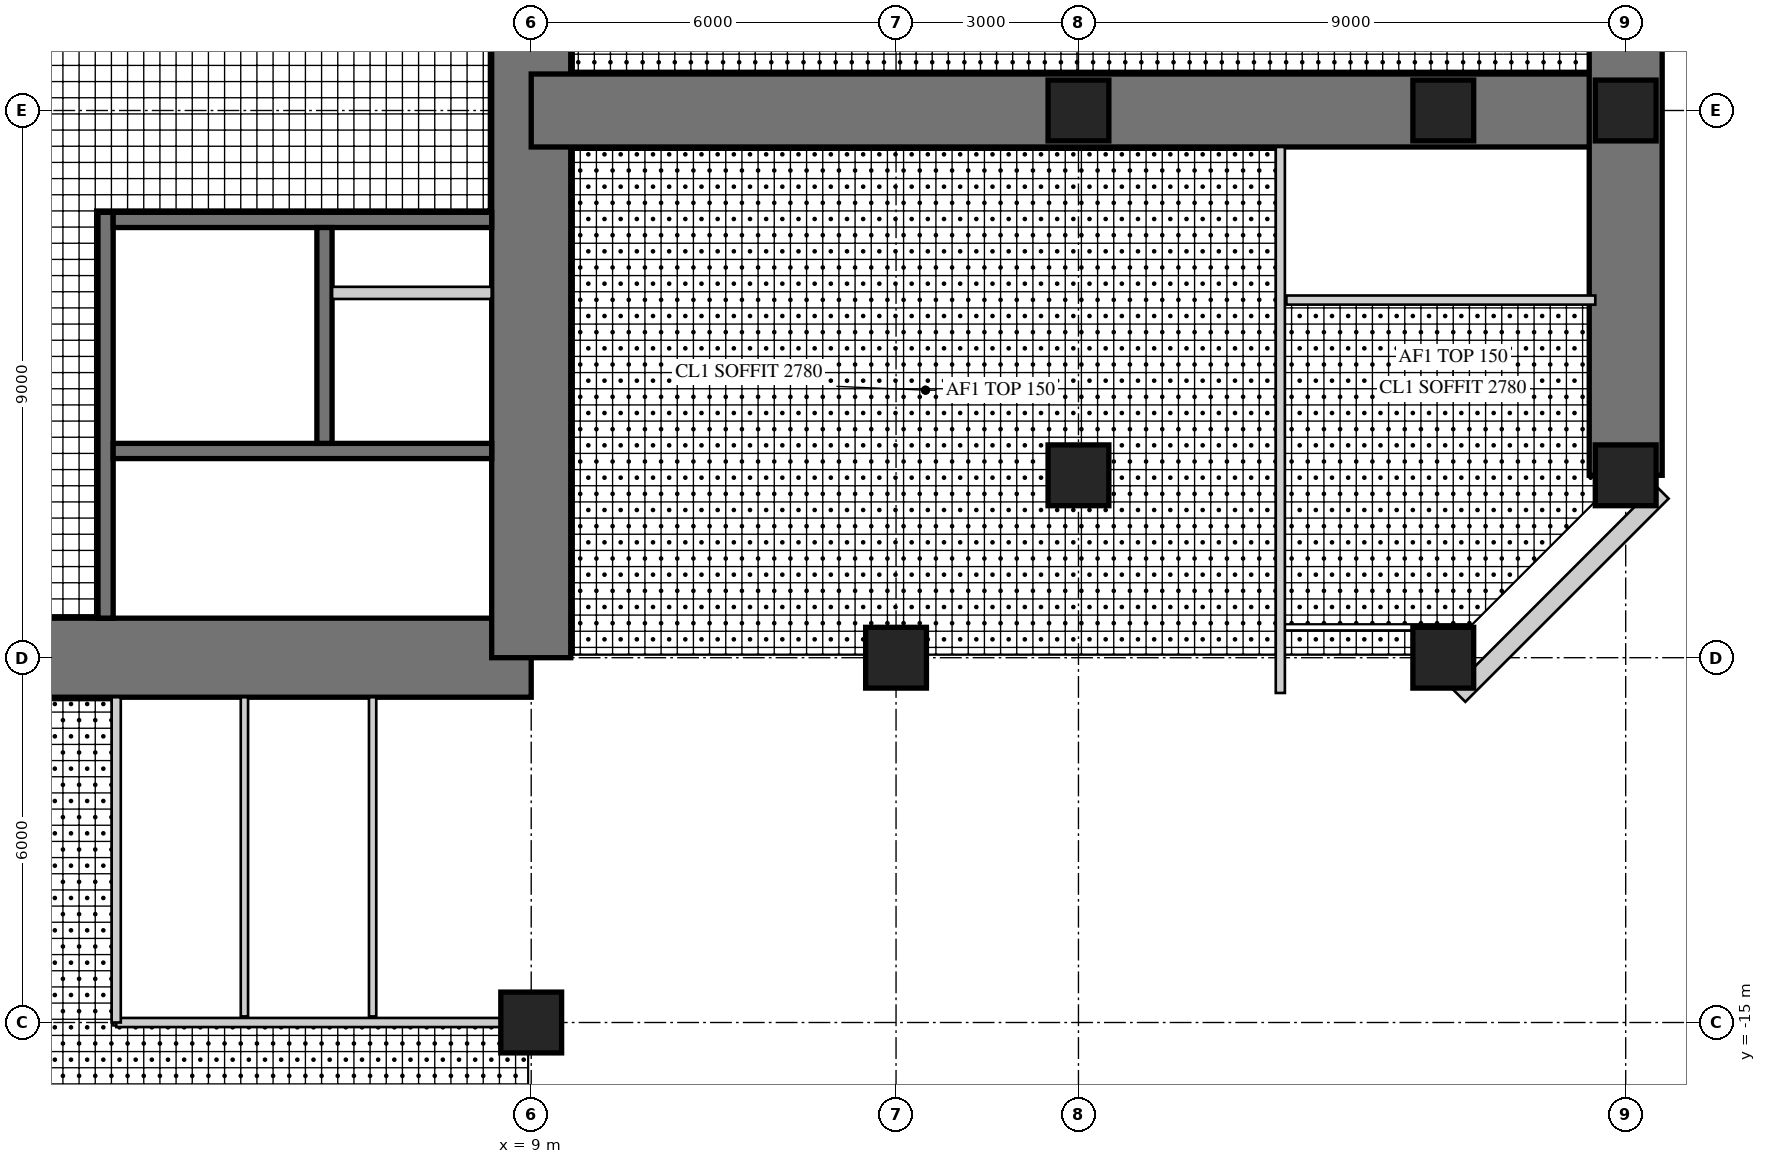
"""IFC4 building model, lengths in metres.
Left out: names, types, materials, properties, quantities, classifications, styles, units other than length and angle.
Written with IfcOpenShell. Run it as: python <this file> out.ifc"""

import sys

from ifc_helpers import new_model, si_unit, direction, frame, frame_2d, origin, origin_2d, place, context, subcontext, project, spatial, rectangle, hollow_rectangle, extrude, element, fill, save


model = new_model("IFC4")
c1 = context("Model", 3, precision=1e-05, world=origin(), true_north=direction((0.0, 1.0)))
c2 = subcontext(c1, "Body", "Model", "MODEL_VIEW")
j1 = project(units=[si_unit("LENGTHUNIT", "METRE"), si_unit("PLANEANGLEUNIT", "RADIAN")], contexts=[c1])
p1 = place(None, origin())
s1 = spatial("IfcSite", under=j1, at=p1, CompositionType="ELEMENT")
p2 = place(p1, origin())
s2 = spatial("IfcBuilding", under=s1, at=p2, CompositionType="ELEMENT")
p3 = place(p2, frame((0.0, 0.0, 116.5)))
s3 = spatial("IfcBuildingStorey", under=s2, at=p3, CompositionType="ELEMENT", Elevation=116.5)
p4 = place(p3, frame((-9.0, -9.0, 0.0), z_axis=(0.0, 0.0, 1.0), x_axis=(1.0, 0.0, 0.0)))
e1 = element("IfcWall", 1, at=p4, inside=s3, PredefinedType="SHEAR", context=c2, shape_type="SweptSolid", body=[
    extrude(rectangle(XDim=18.0, YDim=1.3, at=frame_2d((9.0, 0.0))), origin(), (0.0, 0.0, 1.0), 4.0),
])
p5 = place(p4, frame((9.8, 0.0, 0.0)))
e2 = element("IfcOpeningElement", 2, at=p5, cuts=e1, PredefinedType="OPENING", context=c2, shape_type="SweptSolid", body=[
    extrude(rectangle(XDim=1.0, YDim=2.4, at=frame_2d((0.5, 1.2))), frame((0.0, 0.66, 0.0), z_axis=(0.0, -1.0, 0.0), x_axis=(1.0, 0.0, 0.0)), (0.0, 0.0, 1.0), 1.32),
])
p6 = place(p3, frame((9.0, -9.0, 0.0), z_axis=(0.0, 0.0, 1.0), x_axis=(0.0, 1.0, 0.0)))
e3 = element("IfcWall", 3, at=p6, inside=s3, PredefinedType="SHEAR", context=c2, shape_type="SweptSolid", body=[
    extrude(rectangle(XDim=18.0, YDim=1.3, at=frame_2d((9.0, 0.0))), origin(), (0.0, 0.0, 1.0), 4.0),
])
p7 = place(p6, frame((9.8, 0.0, 0.0)))
e4 = element("IfcOpeningElement", 4, at=p7, cuts=e3, PredefinedType="OPENING", context=c2, shape_type="SweptSolid", body=[
    extrude(rectangle(XDim=1.0, YDim=2.4, at=frame_2d((0.5, 1.2))), frame((0.0, 0.66, 0.0), z_axis=(0.0, -1.0, 0.0), x_axis=(1.0, 0.0, 0.0)), (0.0, 0.0, 1.0), 1.32),
])
p8 = place(p3, frame((2.0, -1.675, 0.0), z_axis=(0.0, 0.0, 1.0), x_axis=(0.0, -1.0, 0.0)))
e5 = element("IfcWall", 5, at=p8, inside=s3, PredefinedType="SHEAR", context=c2, shape_type="SweptSolid", body=[
    extrude(rectangle(XDim=6.675, YDim=0.25, at=frame_2d((3.337, 0.0))), origin(), (0.0, 0.0, 1.0), 4.0),
])
p9 = place(p8, frame((0.725, 0.0, 0.0)))
e6 = element("IfcOpeningElement", 6, at=p9, cuts=e5, PredefinedType="OPENING", context=c2, shape_type="SweptSolid", body=[
    extrude(rectangle(XDim=1.0, YDim=2.1, at=frame_2d((0.5, 1.05))), frame((0.0, 0.135, 0.0), z_axis=(0.0, -1.0, 0.0), x_axis=(1.0, 0.0, 0.0)), (0.0, 0.0, 1.0), 0.27),
])
p10 = place(p3, frame((2.125, -1.8, 0.0), z_axis=(0.0, 0.0, 1.0), x_axis=(1.0, 0.0, 0.0)))
e7 = element("IfcWall", 7, at=p10, inside=s3, PredefinedType="SHEAR", context=c2, shape_type="SweptSolid", body=[
    extrude(rectangle(XDim=6.225, YDim=0.25, at=frame_2d((3.113, 0.0))), origin(), (0.0, 0.0, 1.0), 4.0),
])
p11 = place(p3, frame((2.125, -5.6, 0.0), z_axis=(0.0, 0.0, 1.0), x_axis=(1.0, 0.0, 0.0)))
e8 = element("IfcWall", 8, at=p11, inside=s3, PredefinedType="SHEAR", context=c2, shape_type="SweptSolid", body=[
    extrude(rectangle(XDim=6.225, YDim=0.25, at=frame_2d((3.113, 0.0))), origin(), (0.0, 0.0, 1.0), 4.0),
])
p12 = place(p11, frame((0.175, 0.0, 0.0)))
e9 = element("IfcOpeningElement", 9, at=p12, cuts=e8, PredefinedType="OPENING", context=c2, shape_type="SweptSolid", body=[
    extrude(rectangle(XDim=1.0, YDim=2.1, at=frame_2d((0.5, 1.05))), frame((0.0, 0.135, 0.0), z_axis=(0.0, -1.0, 0.0), x_axis=(1.0, 0.0, 0.0)), (0.0, 0.0, 1.0), 0.27),
])
p13 = place(p3, frame((5.6, -1.925, 0.0), z_axis=(0.0, 0.0, 1.0), x_axis=(0.0, -1.0, 0.0)))
e10 = element("IfcWall", 10, at=p13, inside=s3, PredefinedType="SHEAR", context=c2, shape_type="SweptSolid", body=[
    extrude(rectangle(XDim=3.55, YDim=0.25, at=frame_2d((1.775, 0.0))), origin(), (0.0, 0.0, 1.0), 4.0),
])
p14 = place(p13, frame((1.525, 0.0, 0.0)))
e11 = element("IfcOpeningElement", 11, at=p14, cuts=e10, PredefinedType="OPENING", context=c2, shape_type="SweptSolid", body=[
    extrude(rectangle(XDim=1.1, YDim=2.2, at=frame_2d((0.55, 1.1))), frame((0.0, 0.135, 0.0), z_axis=(0.0, -1.0, 0.0), x_axis=(1.0, 0.0, 0.0)), (0.0, 0.0, 1.0), 0.27),
])
p15 = place(p13, frame((0.075, 0.0, 0.0)))
e12 = element("IfcOpeningElement", 12, at=p15, cuts=e10, PredefinedType="OPENING", context=c2, shape_type="SweptSolid", body=[
    extrude(rectangle(XDim=0.8, YDim=2.1, at=frame_2d((0.4, 1.05))), frame((0.0, 0.135, 0.0), z_axis=(0.0, -1.0, 0.0), x_axis=(1.0, 0.0, 0.0)), (0.0, 0.0, 1.0), 0.27),
])
p16 = place(p3, frame((5.725, -3.0, 0.0), z_axis=(0.0, 0.0, 1.0), x_axis=(1.0, 0.0, 0.0)))
e13 = element("IfcWall", 13, at=p16, inside=s3, PredefinedType="PARTITIONING", context=c2, shape_type="SweptSolid", body=[
    extrude(rectangle(XDim=2.625, YDim=0.2, at=frame_2d((1.312, 0.0))), origin(), (0.0, 0.0, 1.0), 4.0),
])
p17 = place(p3, frame((9.0, 0.0, 0.0), z_axis=(0.0, 0.0, 1.0), x_axis=(1.0, 0.0, 0.0)))
e14 = element("IfcWall", 14, at=p17, inside=s3, PredefinedType="SHEAR", context=c2, shape_type="SweptSolid", body=[
    extrude(rectangle(XDim=18.0, YDim=1.2, at=frame_2d((9.0, 0.0))), origin(), (0.0, 0.0, 1.0), 4.0),
])
p18 = place(p17, frame((9.8, 0.0, 0.0)))
e15 = element("IfcOpeningElement", 15, at=p18, cuts=e14, PredefinedType="OPENING", context=c2, shape_type="SweptSolid", body=[
    extrude(rectangle(XDim=1.0, YDim=2.2, at=frame_2d((0.5, 1.1))), frame((0.0, 0.61, 0.0), z_axis=(0.0, -1.0, 0.0), x_axis=(1.0, 0.0, 0.0)), (0.0, 0.0, 1.0), 1.22),
])
p19 = place(p3, frame((27.0, -6.0, 0.0), z_axis=(0.0, 0.0, 1.0), x_axis=(0.0, 1.0, 0.0)))
e16 = element("IfcWall", 16, at=p19, inside=s3, PredefinedType="SHEAR", context=c2, shape_type="SweptSolid", body=[
    extrude(rectangle(XDim=12.0, YDim=1.2, at=frame_2d((6.0, 0.0))), origin(), (0.0, 0.0, 1.0), 4.0),
])
p20 = place(p19, frame((1.55, 0.0, 0.6)))
e17 = element("IfcOpeningElement", 17, at=p20, cuts=e16, PredefinedType="OPENING", context=c2, shape_type="SweptSolid", body=[
    extrude(rectangle(XDim=3.0, YDim=2.4, at=frame_2d((1.5, 1.2))), frame((0.0, 0.61, 0.0), z_axis=(0.0, -1.0, 0.0), x_axis=(1.0, 0.0, 0.0)), (0.0, 0.0, 1.0), 1.22),
])
p21 = place(p19, frame((7.45, 0.0, 0.6)))
e18 = element("IfcOpeningElement", 18, at=p21, cuts=e16, PredefinedType="OPENING", context=c2, shape_type="SweptSolid", body=[
    extrude(rectangle(XDim=3.0, YDim=2.4, at=frame_2d((1.5, 1.2))), frame((0.0, 0.61, 0.0), z_axis=(0.0, -1.0, 0.0), x_axis=(1.0, 0.0, 0.0)), (0.0, 0.0, 1.0), 1.22),
])
for number, where, z_axis, x_axis in (
    (19, (15.0, -9.0, 0.0), (0.0, 0.0, 1.0), (1.0, 0.0, 0.0)),
    (20, (24.0, -9.0, 0.0), (0.0, 0.0, 1.0), (1.0, 0.0, 0.0)),
    (21, (27.0, -6.0, 0.0), (0.0, 0.0, 1.0), (1.0, 0.0, 0.0)),
    (22, (27.0, 0.0, 0.0), (0.0, 0.0, 1.0), (1.0, 0.0, 0.0)),
    (23, (9.0, -15.0, 0.0), (0.0, 0.0, 1.0), (1.0, 0.0, 0.0)),
    (24, (18.0, -6.0, 0.0), (0.0, 0.0, 1.0), (1.0, 0.0, 0.0)),
    (25, (18.0, 0.0, 0.0), (0.0, 0.0, 1.0), (1.0, 0.0, 0.0)),
    (26, (24.0, 0.0, 0.0), (0.0, 0.0, 1.0), (1.0, 0.0, 0.0)),
):
    element("IfcColumn", number, at=place(p3, frame(where, z_axis=z_axis, x_axis=x_axis)), inside=s3, PredefinedType="COLUMN", context=c2, shape_type="SweptSolid", body=[
        extrude(rectangle(XDim=1.0, YDim=1.0, at=origin_2d()), origin(), (0.0, 0.0, 1.0), 4.0),
    ])
p22 = place(p3, frame((24.257, -9.62, 0.0), z_axis=(0.0, 0.0, 1.0), x_axis=(0.707106781187, 0.707106781187, 0.0)))
e27 = element("IfcWall", 27, at=p22, inside=s3, PredefinedType="SOLIDWALL", context=c2, shape_type="SweptSolid", body=[
    extrude(rectangle(XDim=4.728, YDim=0.3, at=frame_2d((2.364, 0.0))), origin(), (0.0, 0.0, 1.0), 3.8),
])
p23 = place(p22, frame((1.914, 0.0, 0.3)))
e28 = element("IfcOpeningElement", 28, at=p23, cuts=e27, PredefinedType="OPENING", context=c2, shape_type="SweptSolid", body=[
    extrude(rectangle(XDim=0.9, YDim=2.4, at=frame_2d((0.45, 1.2))), frame((0.0, 0.16, 0.0), z_axis=(0.0, -1.0, 0.0), x_axis=(1.0, 0.0, 0.0)), (0.0, 0.0, 1.0), 0.32),
])
p24 = place(p3, frame((21.42, -3.118, 0.0), z_axis=(0.0, 0.0, 1.0), x_axis=(1.0, 0.0, 0.0)))
e29 = element("IfcWall", 29, at=p24, inside=s3, PredefinedType="PARTITIONING", context=c2, shape_type="SweptSolid", body=[
    extrude(rectangle(XDim=5.08, YDim=0.15, at=frame_2d((2.54, 0.0))), origin(), (0.0, 0.0, 1.0), 3.8),
])
p25 = place(p3, frame((21.32, -9.58, 0.0), z_axis=(0.0, 0.0, 1.0), x_axis=(0.0, 1.0, 0.0)))
e30 = element("IfcWall", 30, at=p25, inside=s3, PredefinedType="PARTITIONING", context=c2, shape_type="SweptSolid", body=[
    extrude(rectangle(XDim=8.98, YDim=0.15, at=frame_2d((4.49, 0.0))), origin(), (0.0, 0.0, 1.0), 3.8),
])
p26 = place(p25, frame((4.987, 0.0, 0.0)))
e31 = element("IfcOpeningElement", 31, at=p26, cuts=e30, PredefinedType="OPENING", context=c2, shape_type="SweptSolid", body=[
    extrude(rectangle(XDim=1.0, YDim=2.2, at=frame_2d((0.5, 1.1))), frame((0.0, 0.085, 0.0), z_axis=(0.0, -1.0, 0.0), x_axis=(1.0, 0.0, 0.0)), (0.0, 0.0, 1.0), 0.17),
])
p27 = place(p25, frame((7.63, 0.0, 0.0)))
e32 = element("IfcOpeningElement", 32, at=p27, cuts=e30, PredefinedType="OPENING", context=c2, shape_type="SweptSolid", body=[
    extrude(rectangle(XDim=1.0, YDim=2.2, at=frame_2d((0.5, 1.1))), frame((0.0, 0.085, 0.0), z_axis=(0.0, -1.0, 0.0), x_axis=(1.0, 0.0, 0.0)), (0.0, 0.0, 1.0), 0.17),
])
p28 = place(p3, frame((2.175, -15.0, 0.0), z_axis=(0.0, 0.0, 1.0), x_axis=(1.0, 0.0, 0.0)))
e33 = element("IfcWall", 33, at=p28, inside=s3, PredefinedType="PARTITIONING", context=c2, shape_type="SweptSolid", body=[
    extrude(rectangle(XDim=6.325, YDim=0.15, at=frame_2d((3.163, 0.0))), origin(), (0.0, 0.0, 1.0), 3.0),
])
p29 = place(p28, frame((0.554, 0.0, 0.0)))
e34 = element("IfcOpeningElement", 34, at=p29, cuts=e33, PredefinedType="OPENING", context=c2, shape_type="SweptSolid", body=[
    extrude(rectangle(XDim=1.0, YDim=2.1, at=frame_2d((0.5, 1.05))), frame((0.0, 0.085, 0.0), z_axis=(0.0, -1.0, 0.0), x_axis=(1.0, 0.0, 0.0)), (0.0, 0.0, 1.0), 0.17),
])
p30 = place(p28, frame((2.663, 0.0, 0.0)))
e35 = element("IfcOpeningElement", 35, at=p30, cuts=e33, PredefinedType="OPENING", context=c2, shape_type="SweptSolid", body=[
    extrude(rectangle(XDim=1.0, YDim=2.1, at=frame_2d((0.5, 1.05))), frame((0.0, 0.085, 0.0), z_axis=(0.0, -1.0, 0.0), x_axis=(1.0, 0.0, 0.0)), (0.0, 0.0, 1.0), 0.17),
])
p31 = place(p28, frame((4.771, 0.0, 0.0)))
e36 = element("IfcOpeningElement", 36, at=p31, cuts=e33, PredefinedType="OPENING", context=c2, shape_type="SweptSolid", body=[
    extrude(rectangle(XDim=1.0, YDim=2.1, at=frame_2d((0.5, 1.05))), frame((0.0, 0.085, 0.0), z_axis=(0.0, -1.0, 0.0), x_axis=(1.0, 0.0, 0.0)), (0.0, 0.0, 1.0), 0.17),
])
p32 = place(p3, frame((2.175, -9.65, 0.0), z_axis=(0.0, 0.0, 1.0), x_axis=(0.0, -1.0, 0.0)))
e37 = element("IfcWall", 37, at=p32, inside=s3, PredefinedType="PARTITIONING", context=c2, shape_type="SweptSolid", body=[
    extrude(rectangle(XDim=5.35, YDim=0.15, at=frame_2d((2.675, 0.0))), origin(), (0.0, 0.0, 1.0), 3.8),
])
for number, where, z_axis, x_axis in (
    (38, (4.283, -9.65, 0.0), (0.0, 0.0, 1.0), (0.0, -1.0, 0.0)),
    (39, (6.392, -9.65, 0.0), (0.0, 0.0, 1.0), (0.0, -1.0, 0.0)),
):
    element("IfcWall", number, at=place(p3, frame(where, z_axis=z_axis, x_axis=x_axis)), inside=s3, PredefinedType="PLUMBINGWALL", context=c2, shape_type="SweptSolid", body=[
        extrude(rectangle(XDim=5.25, YDim=0.12, at=frame_2d((2.625, 0.0))), origin(), (0.0, 0.0, 1.0), 3.8),
    ])
p33 = place(p23, origin())
e40 = element("IfcWindow", 40, at=p33, inside=s3, PartitioningType="SINGLE_PANEL", PredefinedType="WINDOW", context=c2, shape_type="SweptSolid", body=[
    extrude(hollow_rectangle(XDim=0.9, YDim=2.4, WallThickness=0.06, at=frame_2d((0.45, 1.2))), frame((0.0, 0.03, 0.0), z_axis=(0.0, -1.0, 0.0), x_axis=(1.0, 0.0, 0.0)), (0.0, 0.0, 1.0), 0.06),
    extrude(rectangle(XDim=0.779, YDim=2.279, at=frame_2d((0.45, 1.2))), frame((0.0, 0.03, 0.0), z_axis=(0.0, -1.0, 0.0), x_axis=(1.0, 0.0, 0.0)), (0.0, 0.0, 1.0), 0.06),
])
fill(e28, e40)
p34 = place(p20, origin())
e41 = element("IfcWindow", 41, at=p34, inside=s3, PartitioningType="SINGLE_PANEL", PredefinedType="WINDOW", context=c2, shape_type="SweptSolid", body=[
    extrude(hollow_rectangle(XDim=3.0, YDim=2.4, WallThickness=0.06, at=frame_2d((1.5, 1.2))), frame((0.0, 0.03, 0.0), z_axis=(0.0, -1.0, 0.0), x_axis=(1.0, 0.0, 0.0)), (0.0, 0.0, 1.0), 0.06),
    extrude(rectangle(XDim=2.879, YDim=2.279, at=frame_2d((1.5, 1.2))), frame((0.0, 0.03, 0.0), z_axis=(0.0, -1.0, 0.0), x_axis=(1.0, 0.0, 0.0)), (0.0, 0.0, 1.0), 0.06),
])
fill(e17, e41)
p35 = place(p26, frame((1.0, 0.0, 0.0), z_axis=(0.0, 0.0, 1.0), x_axis=(-1.0, 0.0, 0.0)))
e42 = element("IfcDoor", 42, at=p35, inside=s3, OperationType="SINGLE_SWING_LEFT", PredefinedType="DOOR", context=c2, shape_type="SweptSolid", body=[
    extrude(rectangle(XDim=1.0, YDim=2.2, at=frame_2d((0.5, 1.1))), frame((0.0, 0.025, 0.0), z_axis=(0.0, -1.0, 0.0), x_axis=(1.0, 0.0, 0.0)), (0.0, 0.0, 1.0), 0.05),
])
fill(e31, e42)
p36 = place(p27, frame((1.0, 0.0, 0.0), z_axis=(0.0, 0.0, 1.0), x_axis=(-1.0, 0.0, 0.0)))
e43 = element("IfcDoor", 43, at=p36, inside=s3, OperationType="SINGLE_SWING_LEFT", PredefinedType="DOOR", context=c2, shape_type="SweptSolid", body=[
    extrude(rectangle(XDim=1.0, YDim=2.2, at=frame_2d((0.5, 1.1))), frame((0.0, 0.025, 0.0), z_axis=(0.0, -1.0, 0.0), x_axis=(1.0, 0.0, 0.0)), (0.0, 0.0, 1.0), 0.05),
])
fill(e32, e43)
p37 = place(p29, origin())
e44 = element("IfcDoor", 44, at=p37, inside=s3, OperationType="SINGLE_SWING_LEFT", PredefinedType="DOOR", context=c2, shape_type="SweptSolid", body=[
    extrude(rectangle(XDim=1.0, YDim=2.1, at=frame_2d((0.5, 1.05))), frame((0.0, 0.025, 0.0), z_axis=(0.0, -1.0, 0.0), x_axis=(1.0, 0.0, 0.0)), (0.0, 0.0, 1.0), 0.05),
])
fill(e34, e44)
p38 = place(p30, origin())
e45 = element("IfcDoor", 45, at=p38, inside=s3, OperationType="SINGLE_SWING_LEFT", PredefinedType="DOOR", context=c2, shape_type="SweptSolid", body=[
    extrude(rectangle(XDim=1.0, YDim=2.1, at=frame_2d((0.5, 1.05))), frame((0.0, 0.025, 0.0), z_axis=(0.0, -1.0, 0.0), x_axis=(1.0, 0.0, 0.0)), (0.0, 0.0, 1.0), 0.05),
])
fill(e35, e45)
p39 = place(p31, origin())
e46 = element("IfcDoor", 46, at=p39, inside=s3, OperationType="SINGLE_SWING_LEFT", PredefinedType="DOOR", context=c2, shape_type="SweptSolid", body=[
    extrude(rectangle(XDim=1.0, YDim=2.1, at=frame_2d((0.5, 1.05))), frame((0.0, 0.025, 0.0), z_axis=(0.0, -1.0, 0.0), x_axis=(1.0, 0.0, 0.0)), (0.0, 0.0, 1.0), 0.05),
])
fill(e36, e46)
p40 = place(p18, frame((1.0, 0.0, 0.0), z_axis=(0.0, 0.0, 1.0), x_axis=(-1.0, 0.0, 0.0)))
e47 = element("IfcDoor", 47, at=p40, inside=s3, OperationType="SINGLE_SWING_LEFT", PredefinedType="DOOR", context=c2, shape_type="SweptSolid", body=[
    extrude(rectangle(XDim=1.0, YDim=2.2, at=frame_2d((0.5, 1.1))), frame((0.0, 0.025, 0.0), z_axis=(0.0, -1.0, 0.0), x_axis=(1.0, 0.0, 0.0)), (0.0, 0.0, 1.0), 0.05),
])
fill(e15, e47)
p41 = place(p5, frame((1.0, 0.0, 0.0), z_axis=(0.0, 0.0, 1.0), x_axis=(-1.0, 0.0, 0.0)))
e48 = element("IfcDoor", 48, at=p41, inside=s3, OperationType="SINGLE_SWING_RIGHT", PredefinedType="DOOR", context=c2, shape_type="SweptSolid", body=[
    extrude(rectangle(XDim=1.0, YDim=2.4, at=frame_2d((0.5, 1.2))), frame((0.0, -0.005, 0.0), z_axis=(0.0, -1.0, 0.0), x_axis=(1.0, 0.0, 0.0)), (0.0, 0.0, 1.0), 0.05),
])
fill(e2, e48)
p42 = place(p7, frame((1.0, 0.0, 0.0), z_axis=(0.0, 0.0, 1.0), x_axis=(-1.0, 0.0, 0.0)))
e49 = element("IfcDoor", 49, at=p42, inside=s3, OperationType="SINGLE_SWING_RIGHT", PredefinedType="DOOR", context=c2, shape_type="SweptSolid", body=[
    extrude(rectangle(XDim=1.0, YDim=2.4, at=frame_2d((0.5, 1.2))), frame((0.0, -0.005, 0.0), z_axis=(0.0, -1.0, 0.0), x_axis=(1.0, 0.0, 0.0)), (0.0, 0.0, 1.0), 0.05),
])
fill(e4, e49)
p43 = place(p9, origin())
e50 = element("IfcDoor", 50, at=p43, inside=s3, OperationType="SINGLE_SWING_LEFT", PredefinedType="DOOR", context=c2, shape_type="SweptSolid", body=[
    extrude(rectangle(XDim=1.0, YDim=2.1, at=frame_2d((0.5, 1.05))), frame((0.0, 0.025, 0.0), z_axis=(0.0, -1.0, 0.0), x_axis=(1.0, 0.0, 0.0)), (0.0, 0.0, 1.0), 0.05),
])
fill(e6, e50)
p44 = place(p12, frame((1.0, 0.0, 0.0), z_axis=(0.0, 0.0, 1.0), x_axis=(-1.0, 0.0, 0.0)))
e51 = element("IfcDoor", 51, at=p44, inside=s3, OperationType="SINGLE_SWING_RIGHT", PredefinedType="DOOR", context=c2, shape_type="SweptSolid", body=[
    extrude(rectangle(XDim=1.0, YDim=2.1, at=frame_2d((0.5, 1.05))), frame((0.0, 0.025, 0.0), z_axis=(0.0, -1.0, 0.0), x_axis=(1.0, 0.0, 0.0)), (0.0, 0.0, 1.0), 0.05),
])
fill(e9, e51)
p45 = place(p14, origin())
e52 = element("IfcDoor", 52, at=p45, inside=s3, OperationType="DOUBLE_DOOR_SLIDING", PredefinedType="DOOR", context=c2, shape_type="SweptSolid", body=[
    extrude(rectangle(XDim=1.1, YDim=2.2, at=frame_2d((0.55, 1.1))), frame((0.0, 0.025, 0.0), z_axis=(0.0, -1.0, 0.0), x_axis=(1.0, 0.0, 0.0)), (0.0, 0.0, 1.0), 0.05),
])
fill(e11, e52)
p46 = place(p15, origin())
e53 = element("IfcDoor", 53, at=p46, inside=s3, OperationType="SINGLE_SWING_LEFT", PredefinedType="DOOR", context=c2, shape_type="SweptSolid", body=[
    extrude(rectangle(XDim=0.8, YDim=2.1, at=frame_2d((0.4, 1.05))), frame((0.0, 0.025, 0.0), z_axis=(0.0, -1.0, 0.0), x_axis=(1.0, 0.0, 0.0)), (0.0, 0.0, 1.0), 0.05),
])
fill(e12, e53)
save(model, sys.argv[1])
